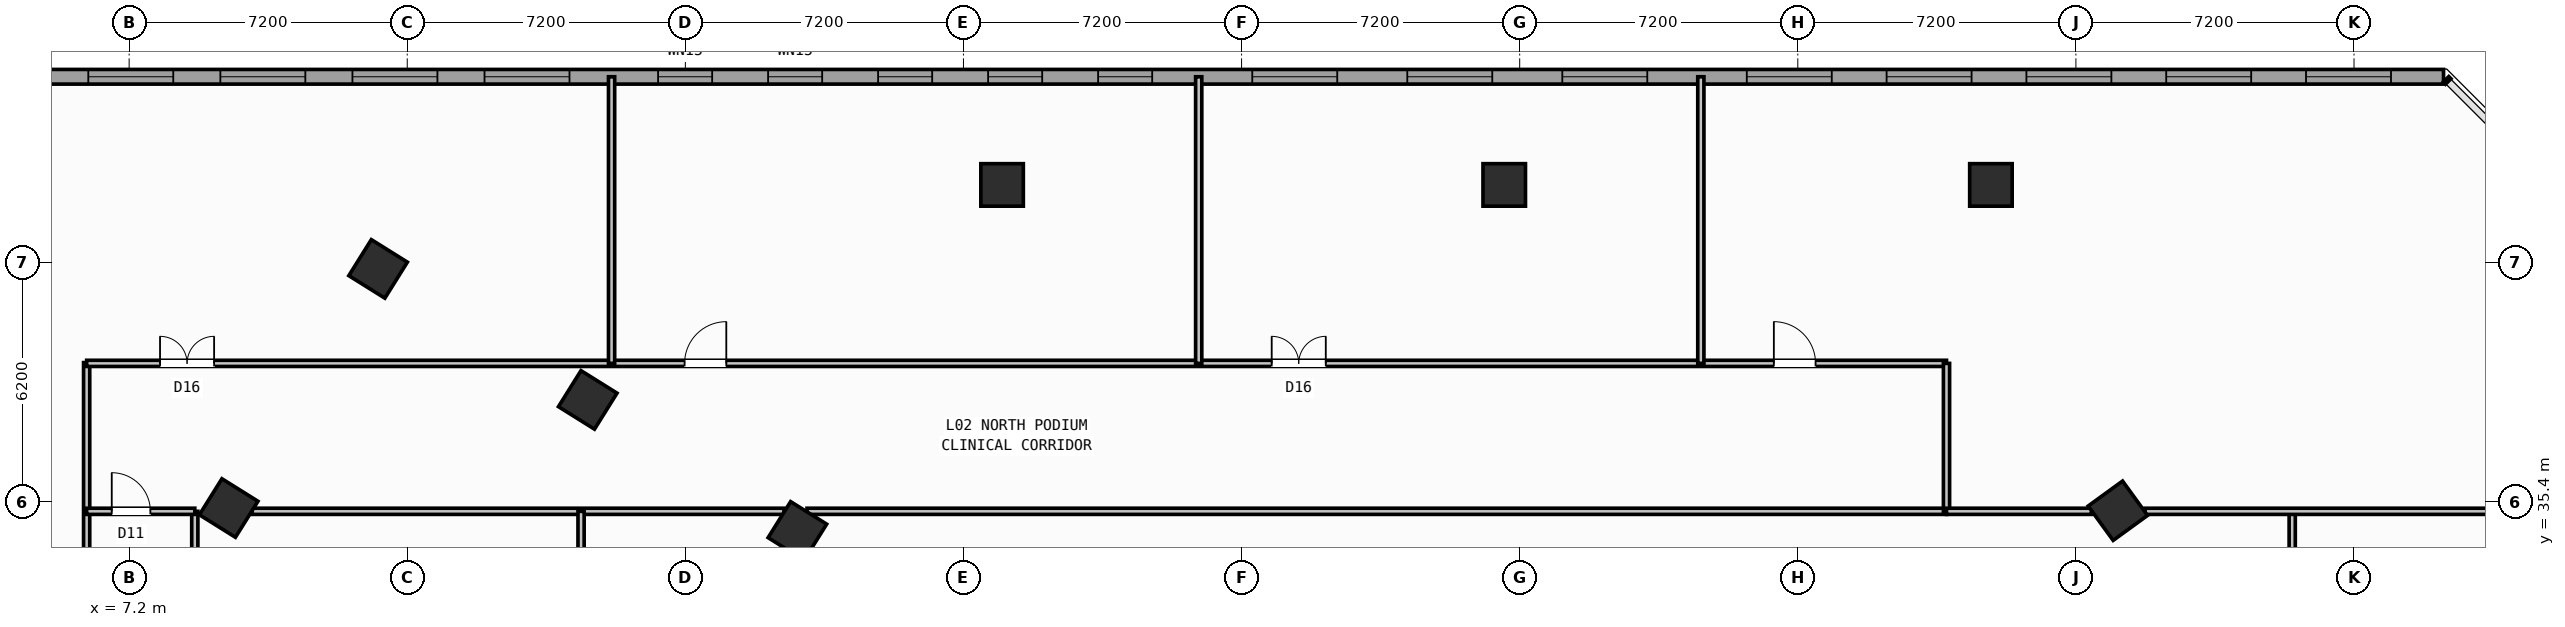
"""IFC4 building model, lengths in metres.
Left out: names, types, materials, properties, quantities, classifications, styles, units other than length and angle.
Written with IfcOpenShell. Run it as: python <this file> out.ifc"""

import sys

from ifc_helpers import new_model, si_unit, direction, frame, frame_2d, origin, origin_2d, place, context, subcontext, project, spatial, rectangle, hollow_rectangle, extrude, source, transform, mapped, element, fill, save


model = new_model("IFC4")
c1 = context("Model", 3, precision=1e-05, world=origin(), true_north=direction((0.0, 1.0)))
c2 = subcontext(c1, "Body", "Model", "MODEL_VIEW")
j1 = project(units=[si_unit("LENGTHUNIT", "METRE"), si_unit("PLANEANGLEUNIT", "RADIAN")], contexts=[c1])
p1 = place(None, origin())
s1 = spatial("IfcSite", under=j1, at=p1, CompositionType="ELEMENT")
p2 = place(p1, origin())
s2 = spatial("IfcBuilding", under=s1, at=p2, CompositionType="ELEMENT")
p3 = place(p2, frame((0.0, 0.0, 10.2)))
s3 = spatial("IfcBuildingStorey", under=s2, at=p3, CompositionType="ELEMENT", Elevation=10.2)
m1 = source(origin(), c2, "Body", "SweptSolid", [
    extrude(hollow_rectangle(XDim=1.1, YDim=1.1, WallThickness=0.04, at=origin_2d()), origin(), (0.0, 0.0, 1.0), 4.2),
])
for number, where, z_axis, x_axis in (
    (1, (29.8, 43.6, 0.0), (0.0, 0.0, 1.0), (1.0, 0.0, 0.0)),
    (2, (42.8, 43.6, 0.0), (0.0, 0.0, 1.0), (1.0, 0.0, 0.0)),
    (3, (55.4, 43.6, 0.0), (0.0, 0.0, 1.0), (1.0, 0.0, 0.0)),
    (4, (24.5, 34.643, 0.0), (0.0, 0.0, 1.0), (-0.848, 0.53, 0.0)),
    (5, (19.073, 38.034, 0.0), (0.0, 0.0, 1.0), (-0.848, 0.53, 0.0)),
    (6, (13.646, 41.426, 0.0), (0.0, 0.0, 1.0), (-0.848, 0.53, 0.0)),
    (7, (9.777, 35.235, 0.0), (0.0, 0.0, 1.0), (-0.848, 0.53, 0.0)),
    (8, (58.686, 35.165, 0.0), (0.0, 0.0, 1.0), (0.809, 0.588, 0.0)),
):
    element("IfcColumn", number, at=place(p3, frame(where, z_axis=z_axis, x_axis=x_axis)), inside=s3, PredefinedType="COLUMN", context=c2, shape_type="MappedRepresentation", body=[
        mapped(m1, transform((0.0, 0.0, 0.0), scale=1.0)),
    ])
p4 = place(p3, frame((4.883, 46.4, 0.0), z_axis=(0.0, 0.0, 1.0), x_axis=(1.0, 0.0, 0.0)))
e9 = element("IfcWall", 9, at=p4, inside=s3, PredefinedType="STANDARD", context=c2, shape_type="SweptSolid", body=[
    extrude(rectangle(XDim=62.234, YDim=0.38, at=frame_2d((31.117, 0.0))), origin(), (0.0, 0.0, 1.0), 3.85),
])
p5 = place(p4, frame((1.26, 0.0, 0.85)))
e10 = element("IfcOpeningElement", 10, at=p5, cuts=e9, PredefinedType="OPENING", context=c2, shape_type="SweptSolid", body=[
    extrude(rectangle(XDim=2.2, YDim=1.75, at=frame_2d((1.1, 0.875))), frame((0.0, 0.2, 0.0), z_axis=(0.0, -1.0, 0.0), x_axis=(1.0, 0.0, 0.0)), (0.0, 0.0, 1.0), 0.4),
])
p6 = place(p4, frame((4.679, 0.0, 0.85)))
e11 = element("IfcOpeningElement", 11, at=p6, cuts=e9, PredefinedType="OPENING", context=c2, shape_type="SweptSolid", body=[
    extrude(rectangle(XDim=2.2, YDim=1.75, at=frame_2d((1.1, 0.875))), frame((0.0, 0.2, 0.0), z_axis=(0.0, -1.0, 0.0), x_axis=(1.0, 0.0, 0.0)), (0.0, 0.0, 1.0), 0.4),
])
p7 = place(p4, frame((8.098, 0.0, 0.85)))
e12 = element("IfcOpeningElement", 12, at=p7, cuts=e9, PredefinedType="OPENING", context=c2, shape_type="SweptSolid", body=[
    extrude(rectangle(XDim=2.2, YDim=1.75, at=frame_2d((1.1, 0.875))), frame((0.0, 0.2, 0.0), z_axis=(0.0, -1.0, 0.0), x_axis=(1.0, 0.0, 0.0)), (0.0, 0.0, 1.0), 0.4),
])
p8 = place(p4, frame((11.518, 0.0, 0.85)))
e13 = element("IfcOpeningElement", 13, at=p8, cuts=e9, PredefinedType="OPENING", context=c2, shape_type="SweptSolid", body=[
    extrude(rectangle(XDim=2.2, YDim=1.75, at=frame_2d((1.1, 0.875))), frame((0.0, 0.2, 0.0), z_axis=(0.0, -1.0, 0.0), x_axis=(1.0, 0.0, 0.0)), (0.0, 0.0, 1.0), 0.4),
])
p9 = place(p4, frame((16.011, 0.0, 0.95)))
e14 = element("IfcOpeningElement", 14, at=p9, cuts=e9, PredefinedType="OPENING", context=c2, shape_type="SweptSolid", body=[
    extrude(rectangle(XDim=1.4, YDim=1.5, at=frame_2d((0.7, 0.75))), frame((0.0, 0.2, 0.0), z_axis=(0.0, -1.0, 0.0), x_axis=(1.0, 0.0, 0.0)), (0.0, 0.0, 1.0), 0.4),
])
p10 = place(p4, frame((18.859, 0.0, 0.95)))
e15 = element("IfcOpeningElement", 15, at=p10, cuts=e9, PredefinedType="OPENING", context=c2, shape_type="SweptSolid", body=[
    extrude(rectangle(XDim=1.4, YDim=1.5, at=frame_2d((0.7, 0.75))), frame((0.0, 0.2, 0.0), z_axis=(0.0, -1.0, 0.0), x_axis=(1.0, 0.0, 0.0)), (0.0, 0.0, 1.0), 0.4),
])
p11 = place(p4, frame((21.707, 0.0, 0.95)))
e16 = element("IfcOpeningElement", 16, at=p11, cuts=e9, PredefinedType="OPENING", context=c2, shape_type="SweptSolid", body=[
    extrude(rectangle(XDim=1.4, YDim=1.5, at=frame_2d((0.7, 0.75))), frame((0.0, 0.2, 0.0), z_axis=(0.0, -1.0, 0.0), x_axis=(1.0, 0.0, 0.0)), (0.0, 0.0, 1.0), 0.4),
])
p12 = place(p4, frame((24.555, 0.0, 0.95)))
e17 = element("IfcOpeningElement", 17, at=p12, cuts=e9, PredefinedType="OPENING", context=c2, shape_type="SweptSolid", body=[
    extrude(rectangle(XDim=1.4, YDim=1.5, at=frame_2d((0.7, 0.75))), frame((0.0, 0.2, 0.0), z_axis=(0.0, -1.0, 0.0), x_axis=(1.0, 0.0, 0.0)), (0.0, 0.0, 1.0), 0.4),
])
p13 = place(p4, frame((27.403, 0.0, 0.95)))
e18 = element("IfcOpeningElement", 18, at=p13, cuts=e9, PredefinedType="OPENING", context=c2, shape_type="SweptSolid", body=[
    extrude(rectangle(XDim=1.4, YDim=1.5, at=frame_2d((0.7, 0.75))), frame((0.0, 0.2, 0.0), z_axis=(0.0, -1.0, 0.0), x_axis=(1.0, 0.0, 0.0)), (0.0, 0.0, 1.0), 0.4),
])
p14 = place(p4, frame((31.394, 0.0, 0.85)))
e19 = element("IfcOpeningElement", 19, at=p14, cuts=e9, PredefinedType="OPENING", context=c2, shape_type="SweptSolid", body=[
    extrude(rectangle(XDim=2.2, YDim=1.75, at=frame_2d((1.1, 0.875))), frame((0.0, 0.2, 0.0), z_axis=(0.0, -1.0, 0.0), x_axis=(1.0, 0.0, 0.0)), (0.0, 0.0, 1.0), 0.4),
])
p15 = place(p4, frame((35.407, 0.0, 0.85)))
e20 = element("IfcOpeningElement", 20, at=p15, cuts=e9, PredefinedType="OPENING", context=c2, shape_type="SweptSolid", body=[
    extrude(rectangle(XDim=2.2, YDim=1.75, at=frame_2d((1.1, 0.875))), frame((0.0, 0.2, 0.0), z_axis=(0.0, -1.0, 0.0), x_axis=(1.0, 0.0, 0.0)), (0.0, 0.0, 1.0), 0.4),
])
p16 = place(p4, frame((39.42, 0.0, 0.85)))
e21 = element("IfcOpeningElement", 21, at=p16, cuts=e9, PredefinedType="OPENING", context=c2, shape_type="SweptSolid", body=[
    extrude(rectangle(XDim=2.2, YDim=1.75, at=frame_2d((1.1, 0.875))), frame((0.0, 0.2, 0.0), z_axis=(0.0, -1.0, 0.0), x_axis=(1.0, 0.0, 0.0)), (0.0, 0.0, 1.0), 0.4),
])
p17 = place(p4, frame((44.197, 0.0, 0.85)))
e22 = element("IfcOpeningElement", 22, at=p17, cuts=e9, PredefinedType="OPENING", context=c2, shape_type="SweptSolid", body=[
    extrude(rectangle(XDim=2.2, YDim=1.75, at=frame_2d((1.1, 0.875))), frame((0.0, 0.2, 0.0), z_axis=(0.0, -1.0, 0.0), x_axis=(1.0, 0.0, 0.0)), (0.0, 0.0, 1.0), 0.4),
])
p18 = place(p4, frame((47.816, 0.0, 0.85)))
e23 = element("IfcOpeningElement", 23, at=p18, cuts=e9, PredefinedType="OPENING", context=c2, shape_type="SweptSolid", body=[
    extrude(rectangle(XDim=2.2, YDim=1.75, at=frame_2d((1.1, 0.875))), frame((0.0, 0.2, 0.0), z_axis=(0.0, -1.0, 0.0), x_axis=(1.0, 0.0, 0.0)), (0.0, 0.0, 1.0), 0.4),
])
p19 = place(p4, frame((51.436, 0.0, 0.85)))
e24 = element("IfcOpeningElement", 24, at=p19, cuts=e9, PredefinedType="OPENING", context=c2, shape_type="SweptSolid", body=[
    extrude(rectangle(XDim=2.2, YDim=1.75, at=frame_2d((1.1, 0.875))), frame((0.0, 0.2, 0.0), z_axis=(0.0, -1.0, 0.0), x_axis=(1.0, 0.0, 0.0)), (0.0, 0.0, 1.0), 0.4),
])
p20 = place(p4, frame((55.055, 0.0, 0.85)))
e25 = element("IfcOpeningElement", 25, at=p20, cuts=e9, PredefinedType="OPENING", context=c2, shape_type="SweptSolid", body=[
    extrude(rectangle(XDim=2.2, YDim=1.75, at=frame_2d((1.1, 0.875))), frame((0.0, 0.2, 0.0), z_axis=(0.0, -1.0, 0.0), x_axis=(1.0, 0.0, 0.0)), (0.0, 0.0, 1.0), 0.4),
])
p21 = place(p4, frame((58.675, 0.0, 0.85)))
e26 = element("IfcOpeningElement", 26, at=p21, cuts=e9, PredefinedType="OPENING", context=c2, shape_type="SweptSolid", body=[
    extrude(rectangle(XDim=2.2, YDim=1.75, at=frame_2d((1.1, 0.875))), frame((0.0, 0.2, 0.0), z_axis=(0.0, -1.0, 0.0), x_axis=(1.0, 0.0, 0.0)), (0.0, 0.0, 1.0), 0.4),
])
p22 = place(p3, frame((6.1, 29.587, 0.0), z_axis=(0.0, 0.0, 1.0), x_axis=(0.0, 1.0, 0.0)))
e27 = element("IfcWall", 27, at=p22, inside=s3, PredefinedType="PARTITIONING", context=c2, shape_type="SweptSolid", body=[
    extrude(rectangle(XDim=9.413, YDim=0.16, at=frame_2d((4.706, 0.0))), origin(), (0.0, 0.0, 1.0), 3.84),
])
p23 = place(p3, frame((8.9, 10.58, 0.0), z_axis=(0.0, 0.0, 1.0), x_axis=(0.0, 1.0, 0.0)))
e28 = element("IfcWall", 28, at=p23, inside=s3, PredefinedType="PARTITIONING", context=c2, shape_type="SweptSolid", body=[
    extrude(rectangle(XDim=24.57, YDim=0.16, at=frame_2d((12.285, 0.0))), origin(), (0.0, 0.0, 1.0), 3.84),
])
p24 = place(p3, frame((10.386, 35.15, 0.0), z_axis=(0.0, 0.0, 1.0), x_axis=(1.0, 0.0, 0.0)))
e29 = element("IfcWall", 29, at=p24, inside=s3, PredefinedType="PARTITIONING", context=c2, shape_type="SweptSolid", body=[
    extrude(rectangle(XDim=13.768, YDim=0.16, at=frame_2d((6.884, 0.0))), origin(), (0.0, 0.0, 1.0), 3.84),
])
p25 = place(p3, frame((24.749, 35.15, 0.0), z_axis=(0.0, 0.0, 1.0), x_axis=(1.0, 0.0, 0.0)))
e30 = element("IfcWall", 30, at=p25, inside=s3, PredefinedType="PARTITIONING", context=c2, shape_type="SweptSolid", body=[
    extrude(rectangle(XDim=29.501, YDim=0.16, at=frame_2d((14.75, 0.0))), origin(), (0.0, 0.0, 1.0), 3.84),
])
p26 = place(p3, frame((6.1, 38.98, 0.0), z_axis=(0.0, 0.0, 1.0), x_axis=(1.0, 0.0, 0.0)))
e31 = element("IfcWall", 31, at=p26, inside=s3, PredefinedType="PARTITIONING", context=c2, shape_type="SweptSolid", body=[
    extrude(rectangle(XDim=48.15, YDim=0.16, at=frame_2d((24.075, 0.0))), origin(), (0.0, 0.0, 1.0), 3.84),
])
p27 = place(p26, frame((1.9, 0.0, 0.0)))
e32 = element("IfcOpeningElement", 32, at=p27, cuts=e31, PredefinedType="OPENING", context=c2, shape_type="SweptSolid", body=[
    extrude(rectangle(XDim=1.4, YDim=2.15, at=frame_2d((0.7, 1.075))), frame((0.0, 0.09, 0.0), z_axis=(0.0, -1.0, 0.0), x_axis=(1.0, 0.0, 0.0)), (0.0, 0.0, 1.0), 0.18),
])
p28 = place(p26, frame((15.48, 0.0, 0.0)))
e33 = element("IfcOpeningElement", 33, at=p28, cuts=e31, PredefinedType="OPENING", context=c2, shape_type="SweptSolid", body=[
    extrude(rectangle(XDim=1.08, YDim=2.15, at=frame_2d((0.54, 1.075))), frame((0.0, 0.09, 0.0), z_axis=(0.0, -1.0, 0.0), x_axis=(1.0, 0.0, 0.0)), (0.0, 0.0, 1.0), 0.18),
])
p29 = place(p26, frame((30.68, 0.0, 0.0)))
e34 = element("IfcOpeningElement", 34, at=p29, cuts=e31, PredefinedType="OPENING", context=c2, shape_type="SweptSolid", body=[
    extrude(rectangle(XDim=1.4, YDim=2.15, at=frame_2d((0.7, 1.075))), frame((0.0, 0.09, 0.0), z_axis=(0.0, -1.0, 0.0), x_axis=(1.0, 0.0, 0.0)), (0.0, 0.0, 1.0), 0.18),
])
p30 = place(p26, frame((43.68, 0.0, 0.0)))
e35 = element("IfcOpeningElement", 35, at=p30, cuts=e31, PredefinedType="OPENING", context=c2, shape_type="SweptSolid", body=[
    extrude(rectangle(XDim=1.08, YDim=2.15, at=frame_2d((0.54, 1.075))), frame((0.0, 0.09, 0.0), z_axis=(0.0, -1.0, 0.0), x_axis=(1.0, 0.0, 0.0)), (0.0, 0.0, 1.0), 0.18),
])
p31 = place(p3, frame((54.25, 35.15, 0.0), z_axis=(0.0, 0.0, 1.0), x_axis=(0.0, 1.0, 0.0)))
e36 = element("IfcWall", 36, at=p31, inside=s3, PredefinedType="PARTITIONING", context=c2, shape_type="SweptSolid", body=[
    extrude(rectangle(XDim=3.83, YDim=0.16, at=frame_2d((1.915, 0.0))), origin(), (0.0, 0.0, 1.0), 3.84),
])
p32 = place(p3, frame((6.1, 35.15, 0.0), z_axis=(0.0, 0.0, 1.0), x_axis=(1.0, 0.0, 0.0)))
e37 = element("IfcWall", 37, at=p32, inside=s3, PredefinedType="PARTITIONING", context=c2, shape_type="SweptSolid", body=[
    extrude(rectangle(XDim=2.8, YDim=0.16, at=frame_2d((1.4, 0.0))), origin(), (0.0, 0.0, 1.0), 3.84),
])
p33 = place(p32, frame((0.65, 0.0, 0.0)))
e38 = element("IfcOpeningElement", 38, at=p33, cuts=e37, PredefinedType="OPENING", context=c2, shape_type="SweptSolid", body=[
    extrude(rectangle(XDim=1.0, YDim=2.1, at=frame_2d((0.5, 1.05))), frame((0.0, 0.09, 0.0), z_axis=(0.0, -1.0, 0.0), x_axis=(1.0, 0.0, 0.0)), (0.0, 0.0, 1.0), 0.18),
])
for number, where, z_axis, x_axis in (
    (39, (19.69, 38.98, 0.0), (0.0, 0.0, 1.0), (0.0, 1.0, 0.0)),
    (40, (34.89, 38.98, 0.0), (0.0, 0.0, 1.0), (0.0, 1.0, 0.0)),
    (41, (47.89, 38.98, 0.0), (0.0, 0.0, 1.0), (0.0, 1.0, 0.0)),
):
    element("IfcWall", number, at=place(p3, frame(where, z_axis=z_axis, x_axis=x_axis)), inside=s3, PredefinedType="PARTITIONING", context=c2, shape_type="SweptSolid", body=[
        extrude(rectangle(XDim=7.42, YDim=0.16, at=frame_2d((3.71, 0.0))), origin(), (0.0, 0.0, 1.0), 3.84),
    ])
p34 = place(p3, frame((18.9, 10.58, 0.0), z_axis=(0.0, 0.0, 1.0), x_axis=(0.0, 1.0, 0.0)))
e42 = element("IfcWall", 42, at=p34, inside=s3, PredefinedType="PARTITIONING", context=c2, shape_type="SweptSolid", body=[
    extrude(rectangle(XDim=24.57, YDim=0.16, at=frame_2d((12.285, 0.0))), origin(), (0.0, 0.0, 1.0), 3.84),
])
p35 = place(p3, frame((63.2, 29.908, 0.0), z_axis=(0.0, 0.0, 1.0), x_axis=(0.0, 1.0, 0.0)))
e43 = element("IfcWall", 43, at=p35, inside=s3, PredefinedType="PARTITIONING", context=c2, shape_type="SweptSolid", body=[
    extrude(rectangle(XDim=5.241, YDim=0.16, at=frame_2d((2.621, 0.0))), origin(), (0.0, 0.0, 1.0), 3.84),
])
p36 = place(p3, frame((54.25, 35.15, 0.0), z_axis=(0.0, 0.0, 1.0), x_axis=(1.0, 0.0, 0.0)))
e44 = element("IfcWall", 44, at=p36, inside=s3, PredefinedType="PARTITIONING", context=c2, shape_type="SweptSolid", body=[
    extrude(rectangle(XDim=3.752, YDim=0.16, at=frame_2d((1.876, 0.0))), origin(), (0.0, 0.0, 1.0), 3.84),
])
p37 = place(p3, frame((59.392, 35.15, 0.0), z_axis=(0.0, 0.0, 1.0), x_axis=(1.0, 0.0, 0.0)))
e45 = element("IfcWall", 45, at=p37, inside=s3, PredefinedType="PARTITIONING", context=c2, shape_type="SweptSolid", body=[
    extrude(rectangle(XDim=11.008, YDim=0.16, at=frame_2d((5.504, 0.0))), origin(), (0.0, 0.0, 1.0), 3.84),
])
m2 = source(origin(), c2, "Body", "SweptSolid", [
    extrude(rectangle(XDim=2.2, YDim=1.75, at=frame_2d((1.1, 0.875))), frame((0.0, 0.03, 0.0), z_axis=(0.0, -1.0, 0.0), x_axis=(1.0, 0.0, 0.0)), (0.0, 0.0, 1.0), 0.06),
])
p38 = place(p5, origin())
e46 = element("IfcWindow", 46, at=p38, inside=s3, PartitioningType="SINGLE_PANEL", PredefinedType="WINDOW", context=c2, shape_type="MappedRepresentation", body=[
    mapped(m2, transform((0.0, 0.0, 0.0), scale=1.0)),
])
fill(e10, e46)
p39 = place(p6, origin())
e47 = element("IfcWindow", 47, at=p39, inside=s3, PartitioningType="SINGLE_PANEL", PredefinedType="WINDOW", context=c2, shape_type="MappedRepresentation", body=[
    mapped(m2, transform((0.0, 0.0, 0.0), scale=1.0)),
])
fill(e11, e47)
p40 = place(p7, origin())
e48 = element("IfcWindow", 48, at=p40, inside=s3, PartitioningType="SINGLE_PANEL", PredefinedType="WINDOW", context=c2, shape_type="MappedRepresentation", body=[
    mapped(m2, transform((0.0, 0.0, 0.0), scale=1.0)),
])
fill(e12, e48)
p41 = place(p8, origin())
e49 = element("IfcWindow", 49, at=p41, inside=s3, PartitioningType="SINGLE_PANEL", PredefinedType="WINDOW", context=c2, shape_type="MappedRepresentation", body=[
    mapped(m2, transform((0.0, 0.0, 0.0), scale=1.0)),
])
fill(e13, e49)
m3 = source(origin(), c2, "Body", "SweptSolid", [
    extrude(rectangle(XDim=1.4, YDim=1.5, at=frame_2d((0.7, 0.75))), frame((0.0, 0.03, 0.0), z_axis=(0.0, -1.0, 0.0), x_axis=(1.0, 0.0, 0.0)), (0.0, 0.0, 1.0), 0.06),
])
p42 = place(p9, origin())
e50 = element("IfcWindow", 50, at=p42, inside=s3, PartitioningType="SINGLE_PANEL", PredefinedType="WINDOW", context=c2, shape_type="MappedRepresentation", body=[
    mapped(m3, transform((0.0, 0.0, 0.0), scale=1.0)),
])
fill(e14, e50)
p43 = place(p10, origin())
e51 = element("IfcWindow", 51, at=p43, inside=s3, PartitioningType="SINGLE_PANEL", PredefinedType="WINDOW", context=c2, shape_type="MappedRepresentation", body=[
    mapped(m3, transform((0.0, 0.0, 0.0), scale=1.0)),
])
fill(e15, e51)
p44 = place(p11, origin())
e52 = element("IfcWindow", 52, at=p44, inside=s3, PartitioningType="SINGLE_PANEL", PredefinedType="WINDOW", context=c2, shape_type="MappedRepresentation", body=[
    mapped(m3, transform((0.0, 0.0, 0.0), scale=1.0)),
])
fill(e16, e52)
p45 = place(p12, origin())
e53 = element("IfcWindow", 53, at=p45, inside=s3, PartitioningType="SINGLE_PANEL", PredefinedType="WINDOW", context=c2, shape_type="MappedRepresentation", body=[
    mapped(m3, transform((0.0, 0.0, 0.0), scale=1.0)),
])
fill(e17, e53)
p46 = place(p13, origin())
e54 = element("IfcWindow", 54, at=p46, inside=s3, PartitioningType="SINGLE_PANEL", PredefinedType="WINDOW", context=c2, shape_type="MappedRepresentation", body=[
    mapped(m3, transform((0.0, 0.0, 0.0), scale=1.0)),
])
fill(e18, e54)
p47 = place(p14, origin())
e55 = element("IfcWindow", 55, at=p47, inside=s3, PartitioningType="SINGLE_PANEL", PredefinedType="WINDOW", context=c2, shape_type="MappedRepresentation", body=[
    mapped(m2, transform((0.0, 0.0, 0.0), scale=1.0)),
])
fill(e19, e55)
p48 = place(p15, origin())
e56 = element("IfcWindow", 56, at=p48, inside=s3, PartitioningType="SINGLE_PANEL", PredefinedType="WINDOW", context=c2, shape_type="MappedRepresentation", body=[
    mapped(m2, transform((0.0, 0.0, 0.0), scale=1.0)),
])
fill(e20, e56)
p49 = place(p16, origin())
e57 = element("IfcWindow", 57, at=p49, inside=s3, PartitioningType="SINGLE_PANEL", PredefinedType="WINDOW", context=c2, shape_type="MappedRepresentation", body=[
    mapped(m2, transform((0.0, 0.0, 0.0), scale=1.0)),
])
fill(e21, e57)
p50 = place(p17, origin())
e58 = element("IfcWindow", 58, at=p50, inside=s3, PartitioningType="SINGLE_PANEL", PredefinedType="WINDOW", context=c2, shape_type="MappedRepresentation", body=[
    mapped(m2, transform((0.0, 0.0, 0.0), scale=1.0)),
])
fill(e22, e58)
p51 = place(p18, origin())
e59 = element("IfcWindow", 59, at=p51, inside=s3, PartitioningType="SINGLE_PANEL", PredefinedType="WINDOW", context=c2, shape_type="MappedRepresentation", body=[
    mapped(m2, transform((0.0, 0.0, 0.0), scale=1.0)),
])
fill(e23, e59)
p52 = place(p19, origin())
e60 = element("IfcWindow", 60, at=p52, inside=s3, PartitioningType="SINGLE_PANEL", PredefinedType="WINDOW", context=c2, shape_type="MappedRepresentation", body=[
    mapped(m2, transform((0.0, 0.0, 0.0), scale=1.0)),
])
fill(e24, e60)
p53 = place(p20, origin())
e61 = element("IfcWindow", 61, at=p53, inside=s3, PartitioningType="SINGLE_PANEL", PredefinedType="WINDOW", context=c2, shape_type="MappedRepresentation", body=[
    mapped(m2, transform((0.0, 0.0, 0.0), scale=1.0)),
])
fill(e25, e61)
p54 = place(p21, origin())
e62 = element("IfcWindow", 62, at=p54, inside=s3, PartitioningType="SINGLE_PANEL", PredefinedType="WINDOW", context=c2, shape_type="MappedRepresentation", body=[
    mapped(m2, transform((0.0, 0.0, 0.0), scale=1.0)),
])
fill(e26, e62)
m4 = source(origin(), c2, "Body", "SweptSolid", [
    extrude(rectangle(XDim=1.0, YDim=2.1, at=frame_2d((0.5, 1.05))), frame((0.0, 0.025, 0.0), z_axis=(0.0, -1.0, 0.0), x_axis=(1.0, 0.0, 0.0)), (0.0, 0.0, 1.0), 0.05),
])
p55 = place(p33, origin())
e63 = element("IfcDoor", 63, at=p55, inside=s3, OperationType="SINGLE_SWING_LEFT", PredefinedType="DOOR", context=c2, shape_type="MappedRepresentation", body=[
    mapped(m4, transform((0.0, 0.0, 0.0), scale=1.0)),
])
fill(e38, e63)
m5 = source(origin(), c2, "Body", "SweptSolid", [
    extrude(rectangle(XDim=1.4, YDim=2.15, at=frame_2d((0.7, 1.075))), frame((0.0, 0.025, 0.0), z_axis=(0.0, -1.0, 0.0), x_axis=(1.0, 0.0, 0.0)), (0.0, 0.0, 1.0), 0.05),
])
p56 = place(p27, origin())
e64 = element("IfcDoor", 64, at=p56, inside=s3, OperationType="DOUBLE_DOOR_SINGLE_SWING", PredefinedType="DOOR", context=c2, shape_type="MappedRepresentation", body=[
    mapped(m5, transform((0.0, 0.0, 0.0), scale=1.0)),
])
fill(e32, e64)
m6 = source(origin(), c2, "Body", "SweptSolid", [
    extrude(rectangle(XDim=1.08, YDim=2.15, at=frame_2d((0.54, 1.075))), frame((0.0, 0.025, 0.0), z_axis=(0.0, -1.0, 0.0), x_axis=(1.0, 0.0, 0.0)), (0.0, 0.0, 1.0), 0.05),
])
p57 = place(p28, origin())
e65 = element("IfcDoor", 65, at=p57, inside=s3, OperationType="SINGLE_SWING_RIGHT", PredefinedType="DOOR", context=c2, shape_type="MappedRepresentation", body=[
    mapped(m6, transform((0.0, 0.0, 0.0), scale=1.0)),
])
fill(e33, e65)
p58 = place(p29, origin())
e66 = element("IfcDoor", 66, at=p58, inside=s3, OperationType="DOUBLE_DOOR_SINGLE_SWING", PredefinedType="DOOR", context=c2, shape_type="MappedRepresentation", body=[
    mapped(m5, transform((0.0, 0.0, 0.0), scale=1.0)),
])
fill(e34, e66)
p59 = place(p30, origin())
e67 = element("IfcDoor", 67, at=p59, inside=s3, OperationType="SINGLE_SWING_LEFT", PredefinedType="DOOR", context=c2, shape_type="MappedRepresentation", body=[
    mapped(m6, transform((0.0, 0.0, 0.0), scale=1.0)),
])
fill(e35, e67)
save(model, sys.argv[1])
